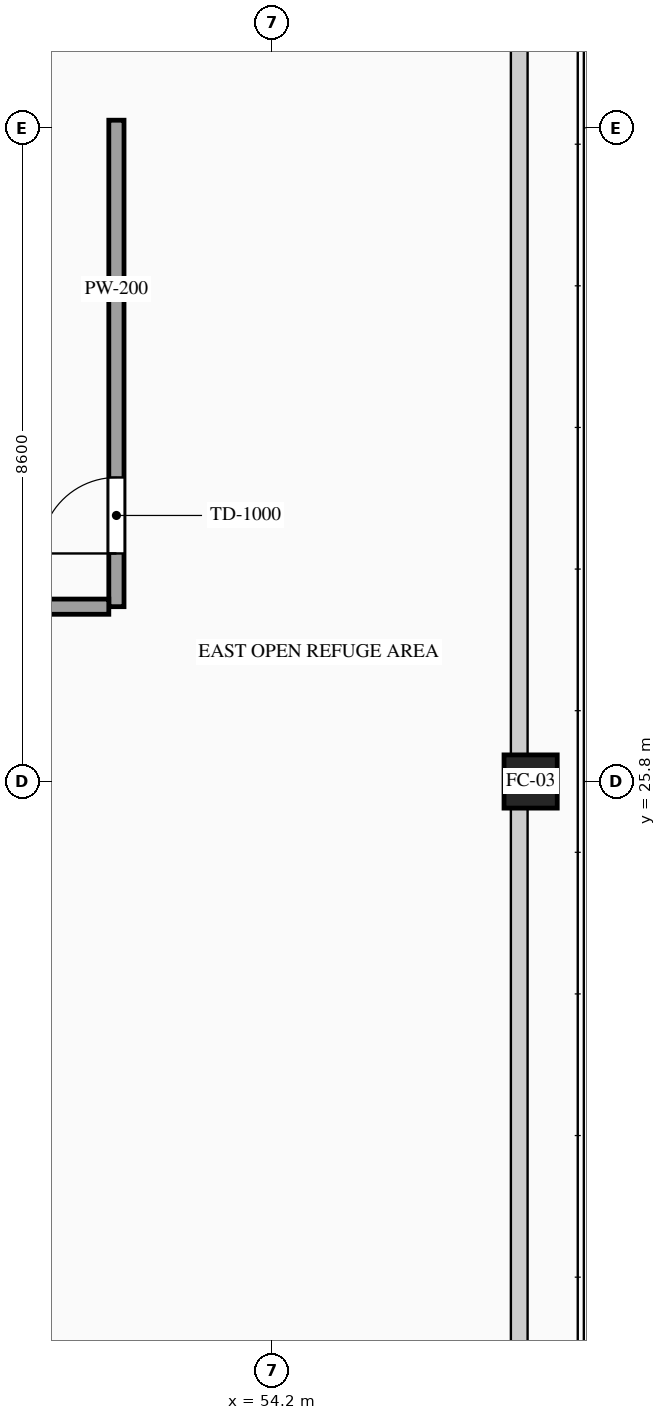
"""IFC4 building model, lengths in metres.
Left out: names, types, materials, properties, quantities, classifications, styles, units other than length and angle.
Written with IfcOpenShell. Run it as: python <this file> out.ifc"""

import sys

from ifc_helpers import new_model, si_unit, direction, frame, frame_2d, origin, origin_2d, place, context, subcontext, project, spatial, rectangle, hollow_rectangle, extrude, source, transform, mapped, element, fill, save


model = new_model("IFC4")
c1 = context("Model", 3, precision=1e-05, world=origin(), true_north=direction((0.0, 1.0)))
c2 = subcontext(c1, "Body", "Model", "MODEL_VIEW")
j1 = project(units=[si_unit("LENGTHUNIT", "METRE"), si_unit("PLANEANGLEUNIT", "RADIAN")], contexts=[c1])
p1 = place(None, origin())
s1 = spatial("IfcSite", under=j1, at=p1, CompositionType="ELEMENT")
p2 = place(p1, origin())
s2 = spatial("IfcBuilding", under=s1, at=p2, CompositionType="ELEMENT")
p3 = place(p2, frame((0.0, 0.0, 219.5)))
s3 = spatial("IfcBuildingStorey", under=s2, at=p3, CompositionType="ELEMENT", Elevation=219.5)
m1 = source(origin(), c2, "Body", "SweptSolid", [
    extrude(hollow_rectangle(XDim=0.7, YDim=0.7, WallThickness=0.032, at=origin_2d()), origin(), (0.0, 0.0, 1.0), 4.6),
])
p4 = place(p3, frame((57.6, 25.8, 0.0), z_axis=(0.0, 0.0, 1.0), x_axis=(1.0, 0.0, 0.0)))
e1 = element("IfcColumn", 1, at=p4, inside=s3, PredefinedType="COLUMN", context=c2, shape_type="MappedRepresentation", body=[
    mapped(m1, transform((0.0, 0.0, 0.0), scale=1.0)),
])
p5 = place(p3, frame((52.15, 28.1, 0.0), z_axis=(0.0, 0.0, 1.0), x_axis=(0.0, 1.0, 0.0)))
e2 = element("IfcWall", 2, at=p5, inside=s3, PredefinedType="PARTITIONING", context=c2, shape_type="SweptSolid", body=[
    extrude(rectangle(XDim=6.4, YDim=0.2, at=frame_2d((3.2, 0.0))), origin(), (0.0, 0.0, 1.0), 4.38),
])
p6 = place(p5, frame((0.7, 0.0, 0.0)))
e3 = element("IfcOpeningElement", 3, at=p6, cuts=e2, PredefinedType="OPENING", context=c2, shape_type="SweptSolid", body=[
    extrude(rectangle(XDim=1.0, YDim=2.2, at=frame_2d((0.5, 1.1))), frame((0.0, 0.115, 0.0), z_axis=(0.0, -1.0, 0.0), x_axis=(1.0, 0.0, 0.0)), (0.0, 0.0, 1.0), 0.23),
])
m2 = source(origin(), c2, "Body", "SweptSolid", [
    extrude(rectangle(XDim=1.555, YDim=0.2, at=frame_2d((0.777, 0.0))), origin(), (0.0, 0.0, 1.0), 4.38),
])
p7 = place(p3, frame((50.495, 28.1, 0.0), z_axis=(0.0, 0.0, 1.0), x_axis=(1.0, 0.0, 0.0)))
e4 = element("IfcWall", 4, at=p7, inside=s3, PredefinedType="PARTITIONING", context=c2, shape_type="MappedRepresentation", body=[
    mapped(m2, transform((0.0, 0.0, 0.0), scale=1.0)),
])
m3 = source(origin(), c2, "Body", "SweptSolid", [
    extrude(rectangle(XDim=1.0, YDim=2.2, at=frame_2d((0.5, 1.1))), frame((0.0, 0.025, 0.0), z_axis=(0.0, -1.0, 0.0), x_axis=(1.0, 0.0, 0.0)), (0.0, 0.0, 1.0), 0.05),
])
p8 = place(p6, origin())
e5 = element("IfcDoor", 5, at=p8, inside=s3, OperationType="SINGLE_SWING_LEFT", PredefinedType="DOOR", context=c2, shape_type="MappedRepresentation", body=[
    mapped(m3, transform((0.0, 0.0, 0.0), scale=1.0)),
])
fill(e3, e5)
save(model, sys.argv[1])
